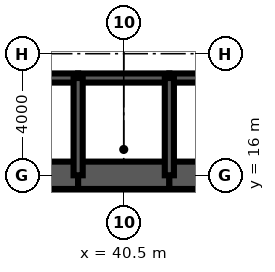
"""IFC4 building model, lengths in metres.
Left out: names, types, materials, properties, quantities, classifications, styles, units other than length and angle.
Written with IfcOpenShell. Run it as: python <this file> out.ifc"""

import sys

from ifc_helpers import new_model, si_unit, direction, frame, frame_2d, origin, place, context, subcontext, project, spatial, rectangle, extrude, element, fill, save


model = new_model("IFC4")
c1 = context("Model", 3, precision=1e-05, world=origin(), true_north=direction((0.0, 1.0)))
c2 = subcontext(c1, "Body", "Model", "MODEL_VIEW")
j1 = project(units=[si_unit("LENGTHUNIT", "METRE"), si_unit("PLANEANGLEUNIT", "RADIAN")], contexts=[c1])
p1 = place(None, origin())
s1 = spatial("IfcSite", under=j1, at=p1, CompositionType="ELEMENT")
p2 = place(p1, origin())
s2 = spatial("IfcBuilding", under=s1, at=p2, CompositionType="ELEMENT")
p3 = place(p2, frame((0.0, 0.0, 121.5)))
s3 = spatial("IfcBuildingStorey", under=s2, at=p3, CompositionType="ELEMENT", Elevation=121.5)
for number, where, z_axis, x_axis in (
    (1, (36.0, 16.0, 0.0), (0.0, 0.0, 1.0), (1.0, 0.0, 0.0)),
    (2, (39.0, 16.0, 0.0), (0.0, 0.0, 1.0), (1.0, 0.0, 0.0)),
    (3, (42.0, 16.0, 0.0), (0.0, 0.0, 1.0), (1.0, 0.0, 0.0)),
):
    element("IfcWall", number, at=place(p3, frame(where, z_axis=z_axis, x_axis=x_axis)), inside=s3, PredefinedType="SHEAR", context=c2, shape_type="SweptSolid", body=[
        extrude(rectangle(XDim=3.0, YDim=0.9, at=frame_2d((1.5, 0.0))), origin(), (0.0, 0.0, 1.0), 4.2),
    ])
p4 = place(p3, frame((36.0, 19.2, 0.0), z_axis=(0.0, 0.0, 1.0), x_axis=(1.0, 0.0, 0.0)))
e4 = element("IfcWall", 4, at=p4, inside=s3, PredefinedType="SOLIDWALL", context=c2, shape_type="SweptSolid", body=[
    extrude(rectangle(XDim=3.0, YDim=0.3, at=frame_2d((1.5, 0.0))), origin(), (0.0, 0.0, 1.0), 4.2),
])
p5 = place(p4, frame((0.95, 0.0, 0.0)))
e5 = element("IfcOpeningElement", 5, at=p5, cuts=e4, PredefinedType="OPENING", context=c2, shape_type="SweptSolid", body=[
    extrude(rectangle(XDim=1.1, YDim=2.2, at=frame_2d((0.55, 1.1))), frame((0.0, 0.16, 0.0), z_axis=(0.0, -1.0, 0.0), x_axis=(1.0, 0.0, 0.0)), (0.0, 0.0, 1.0), 0.32),
])
p6 = place(p3, frame((39.0, 19.2, 0.0), z_axis=(0.0, 0.0, 1.0), x_axis=(1.0, 0.0, 0.0)))
e6 = element("IfcWall", 6, at=p6, inside=s3, PredefinedType="SOLIDWALL", context=c2, shape_type="SweptSolid", body=[
    extrude(rectangle(XDim=3.0, YDim=0.3, at=frame_2d((1.5, 0.0))), origin(), (0.0, 0.0, 1.0), 4.2),
])
p7 = place(p6, frame((1.0, 0.0, 0.0)))
e7 = element("IfcOpeningElement", 7, at=p7, cuts=e6, PredefinedType="OPENING", context=c2, shape_type="SweptSolid", body=[
    extrude(rectangle(XDim=1.0, YDim=2.1, at=frame_2d((0.5, 1.05))), frame((0.0, 0.16, 0.0), z_axis=(0.0, -1.0, 0.0), x_axis=(1.0, 0.0, 0.0)), (0.0, 0.0, 1.0), 0.32),
])
p8 = place(p3, frame((42.0, 19.2, 0.0), z_axis=(0.0, 0.0, 1.0), x_axis=(1.0, 0.0, 0.0)))
e8 = element("IfcWall", 8, at=p8, inside=s3, PredefinedType="SOLIDWALL", context=c2, shape_type="SweptSolid", body=[
    extrude(rectangle(XDim=3.0, YDim=0.3, at=frame_2d((1.5, 0.0))), origin(), (0.0, 0.0, 1.0), 4.2),
])
for number, where, z_axis, x_axis in (
    (9, (39.0, 16.0, 0.0), (0.0, 0.0, 1.0), (0.0, 1.0, 0.0)),
    (10, (42.0, 16.0, 0.0), (0.0, 0.0, 1.0), (0.0, 1.0, 0.0)),
):
    element("IfcWall", number, at=place(p3, frame(where, z_axis=z_axis, x_axis=x_axis)), inside=s3, PredefinedType="SOLIDWALL", context=c2, shape_type="SweptSolid", body=[
        extrude(rectangle(XDim=3.2, YDim=0.3, at=frame_2d((1.6, 0.0))), origin(), (0.0, 0.0, 1.0), 4.2),
    ])
p9 = place(p3, frame((39.15, 17.4, 0.0), z_axis=(0.0, 0.0, 1.0), x_axis=(1.0, 0.0, 0.0)))
e11 = element("IfcWall", 11, at=p9, inside=s3, PredefinedType="SOLIDWALL", context=c2, shape_type="SweptSolid", body=[
    extrude(rectangle(XDim=2.7, YDim=0.3, at=frame_2d((1.35, 0.0))), origin(), (0.0, 0.0, 1.0), 4.04),
])
p10 = place(p9, frame((0.85, 0.0, 0.0)))
e12 = element("IfcOpeningElement", 12, at=p10, cuts=e11, PredefinedType="OPENING", context=c2, shape_type="SweptSolid", body=[
    extrude(rectangle(XDim=1.0, YDim=2.1, at=frame_2d((0.5, 1.05))), frame((0.0, 0.16, 0.0), z_axis=(0.0, -1.0, 0.0), x_axis=(1.0, 0.0, 0.0)), (0.0, 0.0, 1.0), 0.32),
])
p11 = place(p10, origin())
e13 = element("IfcDoor", 13, at=p11, inside=s3, OperationType="SINGLE_SWING_LEFT", PredefinedType="DOOR", context=c2, shape_type="SweptSolid", body=[
    extrude(rectangle(XDim=1.0, YDim=2.1, at=frame_2d((0.5, 1.05))), frame((0.0, 0.025, 0.0), z_axis=(0.0, -1.0, 0.0), x_axis=(1.0, 0.0, 0.0)), (0.0, 0.0, 1.0), 0.05),
])
fill(e12, e13)
p12 = place(p7, origin())
e14 = element("IfcDoor", 14, at=p12, inside=s3, OperationType="SINGLE_SWING_LEFT", PredefinedType="DOOR", context=c2, shape_type="SweptSolid", body=[
    extrude(rectangle(XDim=1.0, YDim=2.1, at=frame_2d((0.5, 1.05))), frame((0.0, 0.025, 0.0), z_axis=(0.0, -1.0, 0.0), x_axis=(1.0, 0.0, 0.0)), (0.0, 0.0, 1.0), 0.05),
])
fill(e7, e14)
save(model, sys.argv[1])
